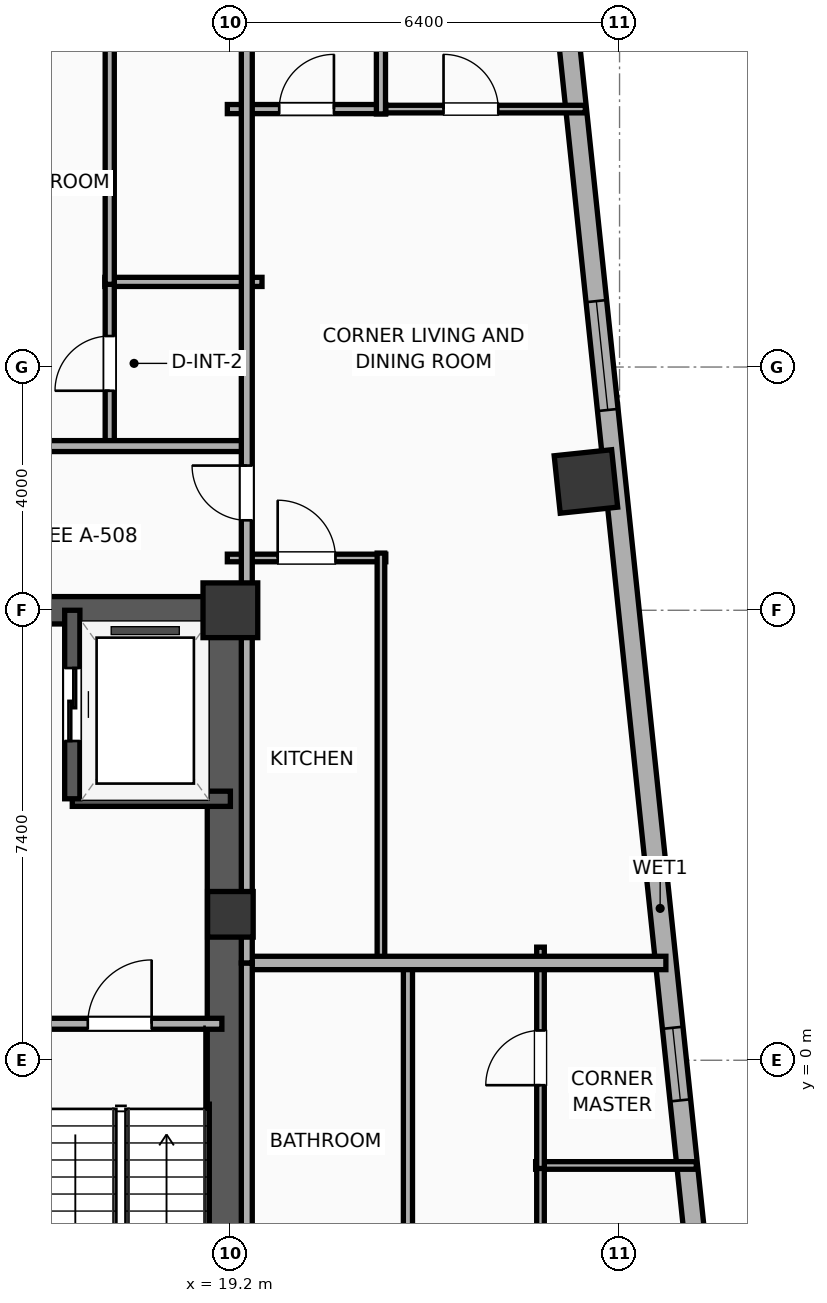
"""IFC4 building model, lengths in metres.
Left out: names, types, materials, properties, quantities, classifications, styles, units other than length and angle.
Written with IfcOpenShell. Run it as: python <this file> out.ifc"""

import sys

from ifc_helpers import new_model, si_unit, direction, frame, frame_2d, origin, origin_2d, place, context, subcontext, project, spatial, rectangle, hollow_rectangle, extrude, element, fill, save


model = new_model("IFC4")
c1 = context("Model", 3, precision=1e-05, world=origin(), true_north=direction((0.0, 1.0)))
c2 = subcontext(c1, "Body", "Model", "MODEL_VIEW")
j1 = project(units=[si_unit("LENGTHUNIT", "METRE"), si_unit("PLANEANGLEUNIT", "RADIAN")], contexts=[c1])
p1 = place(None, origin())
s1 = spatial("IfcSite", under=j1, at=p1, CompositionType="ELEMENT")
p2 = place(p1, origin())
s2 = spatial("IfcBuilding", under=s1, at=p2, CompositionType="ELEMENT")
p3 = place(p2, frame((0.0, 0.0, 167.7)))
s3 = spatial("IfcBuildingStorey", under=s2, at=p3, CompositionType="ELEMENT", Elevation=167.7)
p4 = place(p3, frame((19.2, 2.4, 0.0), z_axis=(0.0, 0.0, 1.0), x_axis=(1.0, 0.0, 0.0)))
e1 = element("IfcColumn", 1, at=p4, inside=s3, PredefinedType="COLUMN", context=c2, shape_type="SweptSolid", body=[
    extrude(rectangle(XDim=0.75, YDim=0.75, at=origin_2d()), origin(), (0.0, 0.0, 1.0), 3.9),
])
p5 = place(p3, frame((19.2, 7.4, 0.0), z_axis=(0.0, 0.0, 1.0), x_axis=(1.0, 0.0, 0.0)))
e2 = element("IfcColumn", 2, at=p5, inside=s3, PredefinedType="COLUMN", context=c2, shape_type="SweptSolid", body=[
    extrude(rectangle(XDim=0.9, YDim=0.9, at=origin_2d()), origin(), (0.0, 0.0, 1.0), 3.9),
])
p6 = place(p3, frame((12.175, 7.4, 0.0), z_axis=(0.0, 0.0, 1.0), x_axis=(1.0, 0.0, 0.0)))
e3 = element("IfcWall", 3, at=p6, inside=s3, PredefinedType="SHEAR", context=c2, shape_type="SweptSolid", body=[
    extrude(rectangle(XDim=7.25, YDim=0.45, at=frame_2d((3.625, 0.0))), origin(), (0.0, 0.0, 1.0), 3.65),
])
p7 = place(p3, frame((19.145, -7.4, 0.0), z_axis=(0.0, 0.0, 1.0), x_axis=(0.0, 1.0, 0.0)))
e4 = element("IfcWall", 4, at=p7, inside=s3, PredefinedType="SHEAR", context=c2, shape_type="SweptSolid", body=[
    extrude(rectangle(XDim=14.8, YDim=0.65, at=frame_2d((7.4, 0.0))), origin(), (0.0, 0.0, 1.0), 3.65),
])
p8 = place(p3, frame((25.047, 9.518, 0.0), z_axis=(0.0, 0.0, 1.0), x_axis=(0.994521895368, 0.104528463268, 0.0)))
e5 = element("IfcColumn", 5, at=p8, inside=s3, PredefinedType="COLUMN", context=c2, shape_type="SweptSolid", body=[
    extrude(hollow_rectangle(XDim=0.95, YDim=0.95, WallThickness=0.032, at=origin_2d()), origin(), (0.0, 0.0, 1.0), 3.9),
])
p9 = place(p3, frame((24.534, 18.99, 0.0), z_axis=(0.0, 0.0, 1.0), x_axis=(0.104534959766, -0.994521212537, 0.0)))
e6 = element("IfcWall", 6, at=p9, inside=s3, PredefinedType="ELEMENTEDWALL", context=c2, shape_type="SweptSolid", body=[
    extrude(rectangle(XDim=33.166, YDim=0.34, at=frame_2d((16.583, 0.0))), origin(), (0.0, 0.0, 1.0), 3.65),
])
p10 = place(p9, frame((6.542, 0.0, 0.75)))
e7 = element("IfcOpeningElement", 7, at=p10, cuts=e6, PredefinedType="OPENING", context=c2, shape_type="SweptSolid", body=[
    extrude(rectangle(XDim=1.8, YDim=2.1, at=frame_2d((0.9, 1.05))), frame((0.0, 0.18, 0.0), z_axis=(0.0, -1.0, 0.0), x_axis=(1.0, 0.0, 0.0)), (0.0, 0.0, 1.0), 0.36),
])
p11 = place(p9, frame((24.825, 0.0, 0.75)))
e8 = element("IfcOpeningElement", 8, at=p11, cuts=e6, PredefinedType="OPENING", context=c2, shape_type="SweptSolid", body=[
    extrude(rectangle(XDim=1.8, YDim=2.1, at=frame_2d((0.9, 1.05))), frame((0.0, 0.18, 0.0), z_axis=(0.0, -1.0, 0.0), x_axis=(1.0, 0.0, 0.0)), (0.0, 0.0, 1.0), 0.36),
])
p12 = place(p9, frame((18.557, 0.0, 0.75)))
e9 = element("IfcOpeningElement", 9, at=p12, cuts=e6, PredefinedType="OPENING", context=c2, shape_type="SweptSolid", body=[
    extrude(rectangle(XDim=1.2, YDim=2.05, at=frame_2d((0.6, 1.025))), frame((0.0, 0.18, 0.0), z_axis=(0.0, -1.0, 0.0), x_axis=(1.0, 0.0, 0.0)), (0.0, 0.0, 1.0), 0.36),
])
p13 = place(p3, frame((16.6, 4.3, 0.0), z_axis=(0.0, 0.0, 1.0), x_axis=(1.0, 0.0, 0.0)))
e10 = element("IfcWall", 10, at=p13, inside=s3, PredefinedType="SOLIDWALL", context=c2, shape_type="SweptSolid", body=[
    extrude(rectangle(XDim=2.6, YDim=0.25, at=frame_2d((1.3, 0.0))), origin(), (0.0, 0.0, 1.0), 3.65),
])
p14 = place(p3, frame((16.6, 7.4, 0.0), z_axis=(0.0, 0.0, 1.0), x_axis=(0.0, -1.0, 0.0)))
e11 = element("IfcWall", 11, at=p14, inside=s3, PredefinedType="SOLIDWALL", context=c2, shape_type="SweptSolid", body=[
    extrude(rectangle(XDim=3.1, YDim=0.25, at=frame_2d((1.55, 0.0))), origin(), (0.0, 0.0, 1.0), 3.65),
])
p15 = place(p14, frame((0.95, 0.0, 0.0)))
e12 = element("IfcOpeningElement", 12, at=p15, cuts=e11, PredefinedType="OPENING", context=c2, shape_type="SweptSolid", body=[
    extrude(rectangle(XDim=1.2, YDim=2.05, at=frame_2d((0.6, 1.025))), frame((0.0, 0.135, 0.0), z_axis=(0.0, -1.0, 0.0), x_axis=(1.0, 0.0, 0.0)), (0.0, 0.0, 1.0), 0.27),
])
p16 = place(p3, frame((15.7, 0.6, 0.0), z_axis=(0.0, 0.0, 1.0), x_axis=(1.0, 0.0, 0.0)))
e13 = element("IfcWall", 13, at=p16, inside=s3, PredefinedType="PARTITIONING", context=c2, shape_type="SweptSolid", body=[
    extrude(rectangle(XDim=3.36, YDim=0.18, at=frame_2d((1.68, 0.0))), origin(), (0.0, 0.0, 1.0), 3.65),
])
p17 = place(p16, frame((1.155, 0.0, 0.0)))
e14 = element("IfcOpeningElement", 14, at=p17, cuts=e13, PredefinedType="OPENING", context=c2, shape_type="SweptSolid", body=[
    extrude(rectangle(XDim=1.05, YDim=2.05, at=frame_2d((0.525, 1.025))), frame((0.0, 0.1, 0.0), z_axis=(0.0, -1.0, 0.0), x_axis=(1.0, 0.0, 0.0)), (0.0, 0.0, 1.0), 0.2),
])
p18 = place(p3, frame((17.136, 12.8, 0.0), z_axis=(0.0, 0.0, 1.0), x_axis=(1.0, 0.0, 0.0)))
e15 = element("IfcWall", 15, at=p18, inside=s3, PredefinedType="PLUMBINGWALL", context=c2, shape_type="SweptSolid", body=[
    extrude(rectangle(XDim=2.584, YDim=0.15, at=frame_2d((1.292, 0.0))), origin(), (0.0, 0.0, 1.0), 3.65),
])
p19 = place(p3, frame((17.216, 10.08, 0.0), z_axis=(0.0, 0.0, 1.0), x_axis=(0.0, 1.0, 0.0)))
e16 = element("IfcWall", 16, at=p19, inside=s3, PredefinedType="PLUMBINGWALL", context=c2, shape_type="SweptSolid", body=[
    extrude(rectangle(XDim=2.76, YDim=0.15, at=frame_2d((1.38, 0.0))), origin(), (0.0, 0.0, 1.0), 3.65),
])
p20 = place(p19, frame((0.93, 0.0, 0.0)))
e17 = element("IfcOpeningElement", 17, at=p20, cuts=e16, PredefinedType="OPENING", context=c2, shape_type="SweptSolid", body=[
    extrude(rectangle(XDim=0.9, YDim=2.05, at=frame_2d((0.45, 1.025))), frame((0.0, 0.085, 0.0), z_axis=(0.0, -1.0, 0.0), x_axis=(1.0, 0.0, 0.0)), (0.0, 0.0, 1.0), 0.17),
])
p21 = place(p3, frame((17.216, 12.76, 0.0), z_axis=(0.0, 0.0, 1.0), x_axis=(0.0, 1.0, 0.0)))
e18 = element("IfcWall", 18, at=p21, inside=s3, PredefinedType="PLUMBINGWALL", context=c2, shape_type="SweptSolid", body=[
    extrude(rectangle(XDim=9.278, YDim=0.15, at=frame_2d((4.639, 0.0))), origin(), (0.0, 0.0, 1.0), 3.65),
])
p22 = place(p21, frame((4.189, 0.0, 0.0)))
e19 = element("IfcOpeningElement", 19, at=p22, cuts=e18, PredefinedType="OPENING", context=c2, shape_type="SweptSolid", body=[
    extrude(rectangle(XDim=0.9, YDim=2.05, at=frame_2d((0.45, 1.025))), frame((0.0, 0.085, 0.0), z_axis=(0.0, -1.0, 0.0), x_axis=(1.0, 0.0, 0.0)), (0.0, 0.0, 1.0), 0.17),
])
p23 = place(p3, frame((8.08, 10.1, 0.0), z_axis=(0.0, 0.0, 1.0), x_axis=(1.0, 0.0, 0.0)))
e20 = element("IfcWall", 20, at=p23, inside=s3, PredefinedType="PARTITIONING", context=c2, shape_type="SweptSolid", body=[
    extrude(rectangle(XDim=11.42, YDim=0.18, at=frame_2d((5.71, 0.0))), origin(), (0.0, 0.0, 1.0), 3.65),
])
p24 = place(p23, frame((2.562, 0.0, 0.0)))
e21 = element("IfcOpeningElement", 21, at=p24, cuts=e20, PredefinedType="OPENING", context=c2, shape_type="SweptSolid", body=[
    extrude(rectangle(XDim=0.9, YDim=2.05, at=frame_2d((0.45, 1.025))), frame((0.0, 0.1, 0.0), z_axis=(0.0, -1.0, 0.0), x_axis=(1.0, 0.0, 0.0)), (0.0, 0.0, 1.0), 0.2),
])
p25 = place(p23, frame((6.853, 0.0, 0.0)))
e22 = element("IfcOpeningElement", 22, at=p25, cuts=e20, PredefinedType="OPENING", context=c2, shape_type="SweptSolid", body=[
    extrude(rectangle(XDim=1.15, YDim=2.05, at=frame_2d((0.575, 1.025))), frame((0.0, 0.1, 0.0), z_axis=(0.0, -1.0, 0.0), x_axis=(1.0, 0.0, 0.0)), (0.0, 0.0, 1.0), 0.2),
])
p26 = place(p3, frame((24.22, -1.73, 0.0), z_axis=(0.0, 0.0, 1.0), x_axis=(1.0, 0.0, 0.0)))
e23 = element("IfcWall", 23, at=p26, inside=s3, PredefinedType="PARTITIONING", context=c2, shape_type="SweptSolid", body=[
    extrude(rectangle(XDim=2.643, YDim=0.125, at=frame_2d((1.321, 0.0))), origin(), (0.0, 0.0, 1.0), 3.65),
])
p27 = place(p3, frame((24.3, -15.06, 0.0), z_axis=(0.0, 0.0, 1.0), x_axis=(0.0, 1.0, 0.0)))
e24 = element("IfcWall", 24, at=p27, inside=s3, PredefinedType="PARTITIONING", context=c2, shape_type="SweptSolid", body=[
    extrude(rectangle(XDim=13.38, YDim=0.125, at=frame_2d((6.69, 0.0))), origin(), (0.0, 0.0, 1.0), 3.65),
])
p28 = place(p27, frame((6.24, 0.0, 0.0)))
e25 = element("IfcOpeningElement", 25, at=p28, cuts=e24, PredefinedType="OPENING", context=c2, shape_type="SweptSolid", body=[
    extrude(rectangle(XDim=0.9, YDim=2.05, at=frame_2d((0.45, 1.025))), frame((0.0, 0.073, 0.0), z_axis=(0.0, -1.0, 0.0), x_axis=(1.0, 0.0, 0.0)), (0.0, 0.0, 1.0), 0.145),
])
p29 = place(p3, frame((24.3, -1.78, 0.0), z_axis=(0.0, 0.0, 1.0), x_axis=(0.0, 1.0, 0.0)))
e26 = element("IfcWall", 26, at=p29, inside=s3, PredefinedType="PARTITIONING", context=c2, shape_type="SweptSolid", body=[
    extrude(rectangle(XDim=3.64, YDim=0.125, at=frame_2d((1.82, 0.0))), origin(), (0.0, 0.0, 1.0), 3.65),
])
p30 = place(p29, frame((1.37, 0.0, 0.0)))
e27 = element("IfcOpeningElement", 27, at=p30, cuts=e26, PredefinedType="OPENING", context=c2, shape_type="SweptSolid", body=[
    extrude(rectangle(XDim=0.9, YDim=2.05, at=frame_2d((0.45, 1.025))), frame((0.0, 0.073, 0.0), z_axis=(0.0, -1.0, 0.0), x_axis=(1.0, 0.0, 0.0)), (0.0, 0.0, 1.0), 0.145),
])
p31 = place(p3, frame((22.12, -5.14, 0.0), z_axis=(0.0, 0.0, 1.0), x_axis=(0.0, 1.0, 0.0)))
e28 = element("IfcWall", 28, at=p31, inside=s3, PredefinedType="PLUMBINGWALL", context=c2, shape_type="SweptSolid", body=[
    extrude(rectangle(XDim=6.72, YDim=0.15, at=frame_2d((3.36, 0.0))), origin(), (0.0, 0.0, 1.0), 3.65),
])
p32 = place(p3, frame((21.616, 15.642, 0.0), z_axis=(0.0, 0.0, 1.0), x_axis=(1.0, 0.0, 0.0)))
e29 = element("IfcWall", 29, at=p32, inside=s3, PredefinedType="PARTITIONING", context=c2, shape_type="SweptSolid", body=[
    extrude(rectangle(XDim=3.421, YDim=0.125, at=frame_2d((1.71, 0.0))), origin(), (0.0, 0.0, 1.0), 3.65),
])
p33 = place(p32, frame((1.089, 0.0, 0.0)))
e30 = element("IfcOpeningElement", 30, at=p33, cuts=e29, PredefinedType="OPENING", context=c2, shape_type="SweptSolid", body=[
    extrude(rectangle(XDim=0.9, YDim=2.05, at=frame_2d((0.45, 1.025))), frame((0.0, 0.073, 0.0), z_axis=(0.0, -1.0, 0.0), x_axis=(1.0, 0.0, 0.0)), (0.0, 0.0, 1.0), 0.145),
])
p34 = place(p3, frame((19.15, 8.26, 0.0), z_axis=(0.0, 0.0, 1.0), x_axis=(1.0, 0.0, 0.0)))
e31 = element("IfcWall", 31, at=p34, inside=s3, PredefinedType="PARTITIONING", context=c2, shape_type="SweptSolid", body=[
    extrude(rectangle(XDim=2.606, YDim=0.125, at=frame_2d((1.303, 0.0))), origin(), (0.0, 0.0, 1.0), 3.04),
])
p35 = place(p34, frame((0.828, 0.0, 0.0)))
e32 = element("IfcOpeningElement", 32, at=p35, cuts=e31, PredefinedType="OPENING", context=c2, shape_type="SweptSolid", body=[
    extrude(rectangle(XDim=0.95, YDim=2.05, at=frame_2d((0.475, 1.025))), frame((0.0, 0.073, 0.0), z_axis=(0.0, -1.0, 0.0), x_axis=(1.0, 0.0, 0.0)), (0.0, 0.0, 1.0), 0.145),
])
p36 = place(p3, frame((19.15, 15.642, 0.0), z_axis=(0.0, 0.0, 1.0), x_axis=(1.0, 0.0, 0.0)))
e33 = element("IfcWall", 33, at=p36, inside=s3, PredefinedType="PLUMBINGWALL", context=c2, shape_type="SweptSolid", body=[
    extrude(rectangle(XDim=2.606, YDim=0.15, at=frame_2d((1.303, 0.0))), origin(), (0.0, 0.0, 1.0), 3.65),
])
p37 = place(p36, frame((0.853, 0.0, 0.0)))
e34 = element("IfcOpeningElement", 34, at=p37, cuts=e33, PredefinedType="OPENING", context=c2, shape_type="SweptSolid", body=[
    extrude(rectangle(XDim=0.9, YDim=2.05, at=frame_2d((0.45, 1.025))), frame((0.0, 0.085, 0.0), z_axis=(0.0, -1.0, 0.0), x_axis=(1.0, 0.0, 0.0)), (0.0, 0.0, 1.0), 0.17),
])
p38 = place(p3, frame((21.676, 1.62, 0.0), z_axis=(0.0, 0.0, 1.0), x_axis=(0.0, 1.0, 0.0)))
e35 = element("IfcWall", 35, at=p38, inside=s3, PredefinedType="PARTITIONING", context=c2, shape_type="SweptSolid", body=[
    extrude(rectangle(XDim=6.72, YDim=0.125, at=frame_2d((3.36, 0.0))), origin(), (0.0, 0.0, 1.0), 3.65),
])
p39 = place(p3, frame((21.676, 15.562, 0.0), z_axis=(0.0, 0.0, 1.0), x_axis=(0.0, 1.0, 0.0)))
e36 = element("IfcWall", 36, at=p39, inside=s3, PredefinedType="PLUMBINGWALL", context=c2, shape_type="SweptSolid", body=[
    extrude(rectangle(XDim=6.718, YDim=0.15, at=frame_2d((3.359, 0.0))), origin(), (0.0, 0.0, 1.0), 3.04),
])
p40 = place(p3, frame((19.47, 1.6, 0.0), z_axis=(0.0, 0.0, 1.0), x_axis=(1.0, 0.0, 0.0)))
e37 = element("IfcWall", 37, at=p40, inside=s3, PredefinedType="PARTITIONING", context=c2, shape_type="SweptSolid", body=[
    extrude(rectangle(XDim=6.892, YDim=0.22, at=frame_2d((3.446, 0.0))), origin(), (0.0, 0.0, 1.0), 3.65),
])
p41 = place(p3, frame((19.47, -18.559, 0.0), z_axis=(0.0, 0.0, 1.0), x_axis=(0.0, 1.0, 0.0)))
e38 = element("IfcWall", 38, at=p41, inside=s3, PredefinedType="PARTITIONING", context=c2, shape_type="SweptSolid", body=[
    extrude(rectangle(XDim=20.159, YDim=0.18, at=frame_2d((10.079, 0.0))), origin(), (0.0, 0.0, 1.0), 3.65),
])
p42 = place(p41, frame((8.779, 0.0, 0.0)))
e39 = element("IfcOpeningElement", 39, at=p42, cuts=e38, PredefinedType="OPENING", context=c2, shape_type="SweptSolid", body=[
    extrude(rectangle(XDim=0.9, YDim=2.05, at=frame_2d((0.45, 1.025))), frame((0.0, 0.1, 0.0), z_axis=(0.0, -1.0, 0.0), x_axis=(1.0, 0.0, 0.0)), (0.0, 0.0, 1.0), 0.2),
])
p43 = place(p3, frame((19.47, 1.6, 0.0), z_axis=(0.0, 0.0, 1.0), x_axis=(0.0, 1.0, 0.0)))
e40 = element("IfcWall", 40, at=p43, inside=s3, PredefinedType="PARTITIONING", context=c2, shape_type="SweptSolid", body=[
    extrude(rectangle(XDim=20.524, YDim=0.18, at=frame_2d((10.262, 0.0))), origin(), (0.0, 0.0, 1.0), 3.04),
])
p44 = place(p43, frame((7.279, 0.0, 0.0)))
e41 = element("IfcOpeningElement", 41, at=p44, cuts=e40, PredefinedType="OPENING", context=c2, shape_type="SweptSolid", body=[
    extrude(rectangle(XDim=0.9, YDim=2.05, at=frame_2d((0.45, 1.025))), frame((0.0, 0.1, 0.0), z_axis=(0.0, -1.0, 0.0), x_axis=(1.0, 0.0, 0.0)), (0.0, 0.0, 1.0), 0.2),
])
p45 = place(p10, origin())
e42 = element("IfcWindow", 42, at=p45, inside=s3, PartitioningType="SINGLE_PANEL", PredefinedType="WINDOW", context=c2, shape_type="SweptSolid", body=[
    extrude(rectangle(XDim=1.8, YDim=2.1, at=frame_2d((0.9, 1.05))), frame((0.0, 0.03, 0.0), z_axis=(0.0, -1.0, 0.0), x_axis=(1.0, 0.0, 0.0)), (0.0, 0.0, 1.0), 0.06),
])
fill(e7, e42)
p46 = place(p12, origin())
e43 = element("IfcWindow", 43, at=p46, inside=s3, PartitioningType="SINGLE_PANEL", PredefinedType="WINDOW", context=c2, shape_type="SweptSolid", body=[
    extrude(rectangle(XDim=1.2, YDim=2.05, at=frame_2d((0.6, 1.025))), frame((0.0, 0.03, 0.0), z_axis=(0.0, -1.0, 0.0), x_axis=(1.0, 0.0, 0.0)), (0.0, 0.0, 1.0), 0.06),
])
fill(e9, e43)
p47 = place(p15, origin())
e44 = element("IfcDoor", 44, at=p47, inside=s3, OperationType="SLIDING_TO_LEFT", PredefinedType="DOOR", context=c2, shape_type="SweptSolid", body=[
    extrude(rectangle(XDim=1.2, YDim=2.05, at=frame_2d((0.6, 1.025))), frame((0.0, 0.025, 0.0), z_axis=(0.0, -1.0, 0.0), x_axis=(1.0, 0.0, 0.0)), (0.0, 0.0, 1.0), 0.05),
])
fill(e12, e44)
p48 = place(p17, origin())
e45 = element("IfcDoor", 45, at=p48, inside=s3, OperationType="SINGLE_SWING_RIGHT", PredefinedType="DOOR", context=c2, shape_type="SweptSolid", body=[
    extrude(rectangle(XDim=1.05, YDim=2.05, at=frame_2d((0.525, 1.025))), frame((0.0, 0.025, 0.0), z_axis=(0.0, -1.0, 0.0), x_axis=(1.0, 0.0, 0.0)), (0.0, 0.0, 1.0), 0.05),
])
fill(e14, e45)
p49 = place(p20, origin())
e46 = element("IfcDoor", 46, at=p49, inside=s3, OperationType="SINGLE_SWING_LEFT", PredefinedType="DOOR", context=c2, shape_type="SweptSolid", body=[
    extrude(rectangle(XDim=0.9, YDim=2.05, at=frame_2d((0.45, 1.025))), frame((0.0, 0.025, 0.0), z_axis=(0.0, -1.0, 0.0), x_axis=(1.0, 0.0, 0.0)), (0.0, 0.0, 1.0), 0.05),
])
fill(e17, e46)
p50 = place(p30, origin())
e47 = element("IfcDoor", 47, at=p50, inside=s3, OperationType="SINGLE_SWING_LEFT", PredefinedType="DOOR", context=c2, shape_type="SweptSolid", body=[
    extrude(rectangle(XDim=0.9, YDim=2.05, at=frame_2d((0.45, 1.025))), frame((0.0, 0.025, 0.0), z_axis=(0.0, -1.0, 0.0), x_axis=(1.0, 0.0, 0.0)), (0.0, 0.0, 1.0), 0.05),
])
fill(e27, e47)
p51 = place(p33, origin())
e48 = element("IfcDoor", 48, at=p51, inside=s3, OperationType="SINGLE_SWING_LEFT", PredefinedType="DOOR", context=c2, shape_type="SweptSolid", body=[
    extrude(rectangle(XDim=0.9, YDim=2.05, at=frame_2d((0.45, 1.025))), frame((0.0, 0.025, 0.0), z_axis=(0.0, -1.0, 0.0), x_axis=(1.0, 0.0, 0.0)), (0.0, 0.0, 1.0), 0.05),
])
fill(e30, e48)
p52 = place(p35, origin())
e49 = element("IfcDoor", 49, at=p52, inside=s3, OperationType="SINGLE_SWING_LEFT", PredefinedType="DOOR", context=c2, shape_type="SweptSolid", body=[
    extrude(rectangle(XDim=0.95, YDim=2.05, at=frame_2d((0.475, 1.025))), frame((0.0, 0.025, 0.0), z_axis=(0.0, -1.0, 0.0), x_axis=(1.0, 0.0, 0.0)), (0.0, 0.0, 1.0), 0.05),
])
fill(e32, e49)
p53 = place(p37, origin())
e50 = element("IfcDoor", 50, at=p53, inside=s3, OperationType="SINGLE_SWING_RIGHT", PredefinedType="DOOR", context=c2, shape_type="SweptSolid", body=[
    extrude(rectangle(XDim=0.9, YDim=2.05, at=frame_2d((0.45, 1.025))), frame((0.0, 0.025, 0.0), z_axis=(0.0, -1.0, 0.0), x_axis=(1.0, 0.0, 0.0)), (0.0, 0.0, 1.0), 0.05),
])
fill(e34, e50)
p54 = place(p44, origin())
e51 = element("IfcDoor", 51, at=p54, inside=s3, OperationType="SINGLE_SWING_RIGHT", PredefinedType="DOOR", context=c2, shape_type="SweptSolid", body=[
    extrude(rectangle(XDim=0.9, YDim=2.05, at=frame_2d((0.45, 1.025))), frame((0.0, 0.025, 0.0), z_axis=(0.0, -1.0, 0.0), x_axis=(1.0, 0.0, 0.0)), (0.0, 0.0, 1.0), 0.05),
])
fill(e41, e51)
save(model, sys.argv[1])
